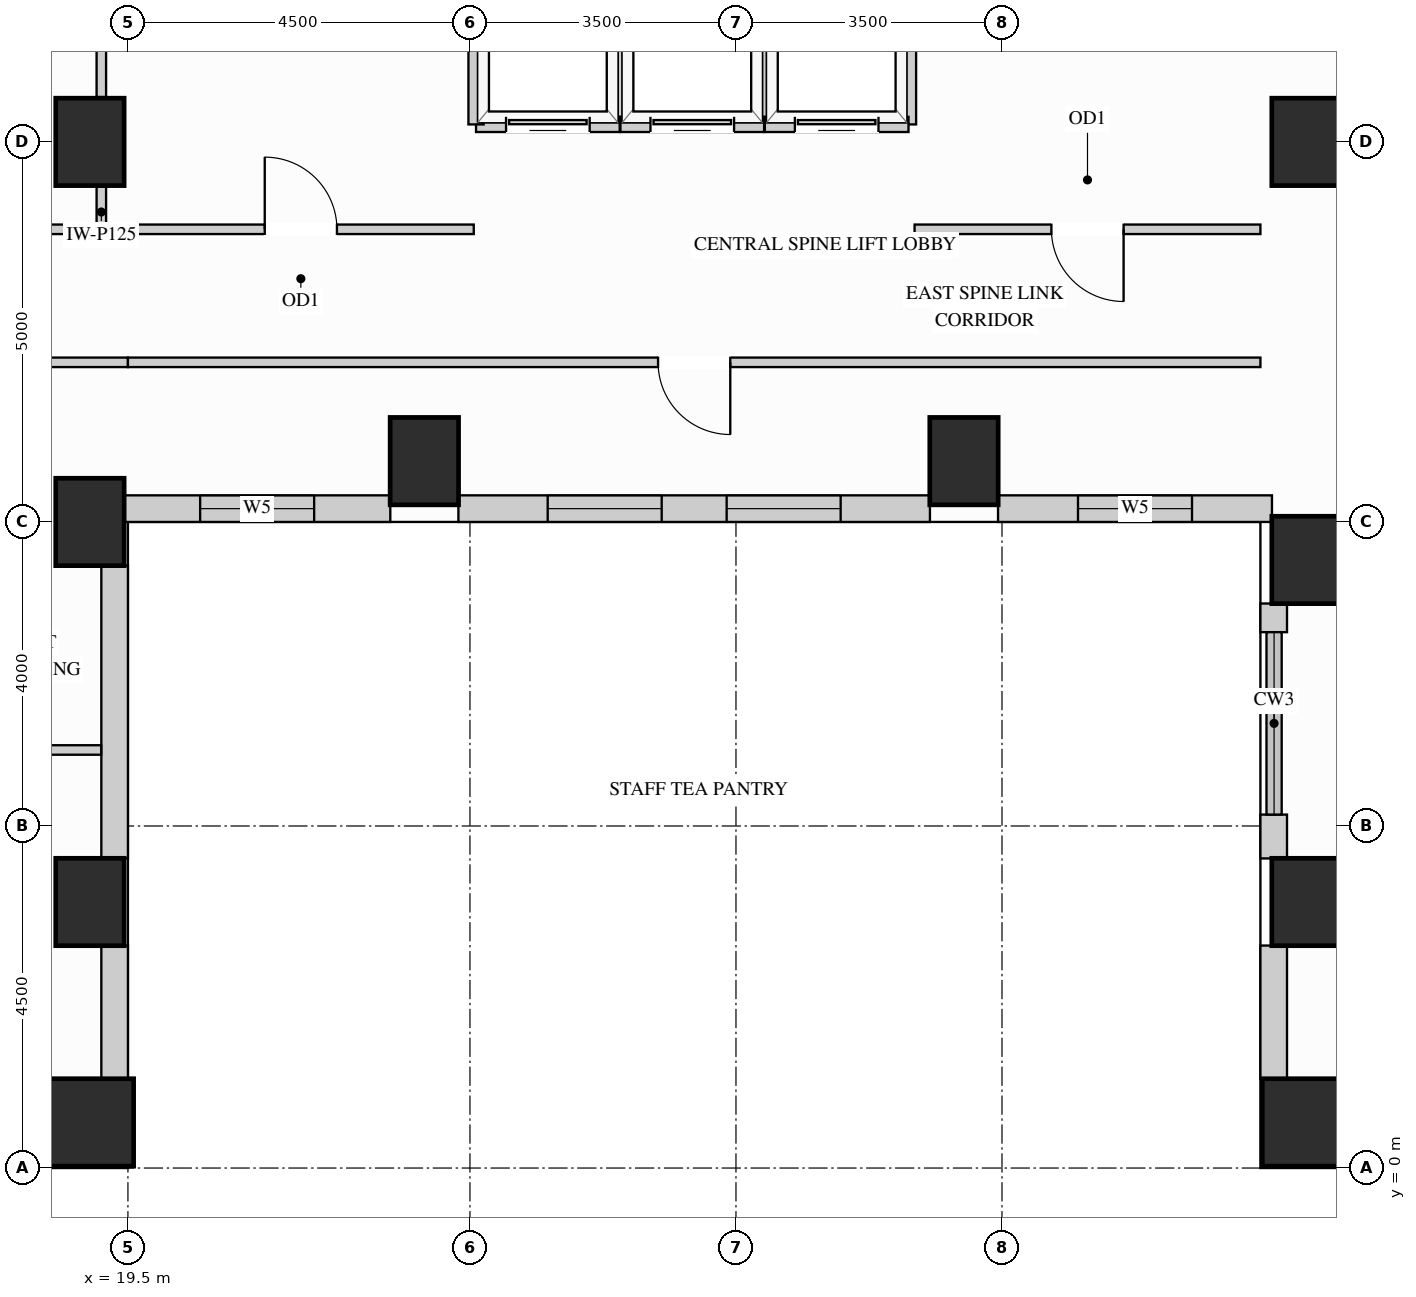
"""IFC4 building model, lengths in metres.
Left out: names, types, materials, properties, quantities, classifications, styles, units other than length and angle.
Written with IfcOpenShell. Run it as: python <this file> out.ifc"""

import sys

from ifc_helpers import new_model, si_unit, direction, frame, frame_2d, origin, origin_2d, place, context, subcontext, project, spatial, rectangle, extrude, source, transform, mapped, element, fill, save


model = new_model("IFC4")
c1 = context("Model", 3, precision=1e-05, world=origin(), true_north=direction((0.0, 1.0)))
c2 = subcontext(c1, "Body", "Model", "MODEL_VIEW")
j1 = project(units=[si_unit("LENGTHUNIT", "METRE"), si_unit("PLANEANGLEUNIT", "RADIAN")], contexts=[c1])
p1 = place(None, origin())
s1 = spatial("IfcSite", under=j1, at=p1, CompositionType="ELEMENT")
p2 = place(p1, origin())
s2 = spatial("IfcBuilding", under=s1, at=p2, CompositionType="ELEMENT")
p3 = place(p2, frame((0.0, 0.0, 131.4)))
s3 = spatial("IfcBuildingStorey", under=s2, at=p3, CompositionType="ELEMENT", Elevation=131.4)
m1 = source(origin(), c2, "Body", "SweptSolid", [
    extrude(rectangle(XDim=0.9, YDim=1.15, at=origin_2d()), origin(), (0.0, 0.0, 1.0), 3.38),
])
for number, where, z_axis, x_axis in (
    (1, (19.0, 13.5, 0.0), (0.0, 0.0, 1.0), (1.0, 0.0, 0.0)),
    (2, (19.0, 3.5, 0.0), (0.0, 0.0, 1.0), (1.0, 0.0, 0.0)),
    (3, (19.0, 8.5, 0.0), (0.0, 0.0, 1.0), (1.0, 0.0, 0.0)),
    (4, (35.0, 13.5, 0.0), (0.0, 0.0, 1.0), (1.0, 0.0, 0.0)),
    (5, (35.0, 3.5, 0.0), (0.0, 0.0, 1.0), (1.0, 0.0, 0.0)),
    (6, (35.0, 8.0, 0.0), (0.0, 0.0, 1.0), (1.0, 0.0, 0.0)),
    (7, (23.4, 9.3, 0.0), (0.0, 0.0, 1.0), (1.0, 0.0, 0.0)),
    (8, (30.5, 9.3, 0.0), (0.0, 0.0, 1.0), (1.0, 0.0, 0.0)),
):
    element("IfcColumn", number, at=place(p3, frame(where, z_axis=z_axis, x_axis=x_axis)), inside=s3, PredefinedType="COLUMN", context=c2, shape_type="MappedRepresentation", body=[
        mapped(m1, transform((0.0, 0.0, 0.0), x_axis=(1.0, 0.0, 0.0), y_axis=(0.0, 1.0, 0.0), z_axis=(0.0, 0.0, 1.0))),
    ])
m2 = source(origin(), c2, "Body", "SweptSolid", [
    extrude(rectangle(XDim=1.15, YDim=1.15, at=origin_2d()), origin(), (0.0, 0.0, 1.0), 3.38),
])
for number, where, z_axis, x_axis in (
    (9, (19.0, 0.6, 0.0), (0.0, 0.0, 1.0), (1.0, 0.0, 0.0)),
    (10, (35.0, 0.6, 0.0), (0.0, 0.0, 1.0), (1.0, 0.0, 0.0)),
):
    element("IfcColumn", number, at=place(p3, frame(where, z_axis=z_axis, x_axis=x_axis)), inside=s3, PredefinedType="COLUMN", context=c2, shape_type="MappedRepresentation", body=[
        mapped(m2, transform((0.0, 0.0, 0.0), x_axis=(1.0, 0.0, 0.0), y_axis=(0.0, 1.0, 0.0), z_axis=(0.0, 0.0, 1.0))),
    ])
m3 = source(origin(), c2, "Body", "SweptSolid", [
    extrude(rectangle(XDim=1.754, YDim=0.35, at=frame_2d((0.877, 0.0))), origin(), (0.0, 0.0, 1.0), 2.519),
])
p4 = place(p3, frame((19.325, 1.173, 0.0), z_axis=(0.0, 0.0, 1.0), x_axis=(0.0, 1.0, 0.0)))
e11 = element("IfcWall", 11, at=p4, inside=s3, PredefinedType="SOLIDWALL", context=c2, shape_type="MappedRepresentation", body=[
    mapped(m3, transform((0.0, 0.0, 0.0), x_axis=(1.0, 0.0, 0.0), y_axis=(0.0, 1.0, 0.0), z_axis=(0.0, 0.0, 1.0))),
])
m4 = source(origin(), c2, "Body", "SweptSolid", [
    extrude(rectangle(XDim=3.854, YDim=0.35, at=frame_2d((1.927, 0.0))), origin(), (0.0, 0.0, 1.0), 2.519),
])
p5 = place(p3, frame((19.325, 4.073, 0.0), z_axis=(0.0, 0.0, 1.0), x_axis=(0.0, 1.0, 0.0)))
e12 = element("IfcWall", 12, at=p5, inside=s3, PredefinedType="SOLIDWALL", context=c2, shape_type="MappedRepresentation", body=[
    mapped(m4, transform((0.0, 0.0, 0.0), x_axis=(1.0, 0.0, 0.0), y_axis=(0.0, 1.0, 0.0), z_axis=(0.0, 0.0, 1.0))),
])
p6 = place(p3, frame((19.448, 8.675, 0.0), z_axis=(0.0, 0.0, 1.0), x_axis=(1.0, 0.0, 0.0)))
e13 = element("IfcWall", 13, at=p6, inside=s3, PredefinedType="SOLIDWALL", context=c2, shape_type="SweptSolid", body=[
    extrude(rectangle(XDim=3.504, YDim=0.35, at=frame_2d((1.752, 0.0))), origin(), (0.0, 0.0, 1.0), 3.365),
])
p7 = place(p6, frame((1.002, 0.0, 0.78)))
e14 = element("IfcOpeningElement", 14, at=p7, cuts=e13, PredefinedType="OPENING", context=c2, shape_type="SweptSolid", body=[
    extrude(rectangle(XDim=1.5, YDim=2.0, at=frame_2d((0.75, 1.0))), frame((0.0, 0.185, 0.0), z_axis=(0.0, -1.0, 0.0), x_axis=(1.0, 0.0, 0.0)), (0.0, 0.0, 1.0), 0.37),
])
p8 = place(p3, frame((23.848, 8.675, 0.0), z_axis=(0.0, 0.0, 1.0), x_axis=(1.0, 0.0, 0.0)))
e15 = element("IfcWall", 15, at=p8, inside=s3, PredefinedType="SOLIDWALL", context=c2, shape_type="SweptSolid", body=[
    extrude(rectangle(XDim=6.204, YDim=0.35, at=frame_2d((3.102, 0.0))), origin(), (0.0, 0.0, 1.0), 3.365),
])
p9 = place(p8, frame((1.175, 0.0, 0.78)))
e16 = element("IfcOpeningElement", 16, at=p9, cuts=e15, PredefinedType="OPENING", context=c2, shape_type="SweptSolid", body=[
    extrude(rectangle(XDim=1.5, YDim=2.0, at=frame_2d((0.75, 1.0))), frame((0.0, 0.185, 0.0), z_axis=(0.0, -1.0, 0.0), x_axis=(1.0, 0.0, 0.0)), (0.0, 0.0, 1.0), 0.37),
])
p10 = place(p8, frame((3.529, 0.0, 0.78)))
e17 = element("IfcOpeningElement", 17, at=p10, cuts=e15, PredefinedType="OPENING", context=c2, shape_type="SweptSolid", body=[
    extrude(rectangle(XDim=1.5, YDim=2.0, at=frame_2d((0.75, 1.0))), frame((0.0, 0.185, 0.0), z_axis=(0.0, -1.0, 0.0), x_axis=(1.0, 0.0, 0.0)), (0.0, 0.0, 1.0), 0.37),
])
p11 = place(p3, frame((30.948, 8.675, 0.0), z_axis=(0.0, 0.0, 1.0), x_axis=(1.0, 0.0, 0.0)))
e18 = element("IfcWall", 18, at=p11, inside=s3, PredefinedType="SOLIDWALL", context=c2, shape_type="SweptSolid", body=[
    extrude(rectangle(XDim=3.604, YDim=0.35, at=frame_2d((1.802, 0.0))), origin(), (0.0, 0.0, 1.0), 3.365),
])
p12 = place(p11, frame((1.052, 0.0, 0.78)))
e19 = element("IfcOpeningElement", 19, at=p12, cuts=e18, PredefinedType="OPENING", context=c2, shape_type="SweptSolid", body=[
    extrude(rectangle(XDim=1.5, YDim=2.0, at=frame_2d((0.75, 1.0))), frame((0.0, 0.185, 0.0), z_axis=(0.0, -1.0, 0.0), x_axis=(1.0, 0.0, 0.0)), (0.0, 0.0, 1.0), 0.37),
])
m5 = source(origin(), c2, "Body", "SweptSolid", [
    extrude(rectangle(XDim=0.377, YDim=0.35, at=frame_2d((0.188, 0.0))), origin(), (0.0, 0.0, 1.0), 3.365),
])
p13 = place(p3, frame((34.575, 7.427, 0.0), z_axis=(0.0, 0.0, 1.0), x_axis=(0.0, -1.0, 0.0)))
e20 = element("IfcWall", 20, at=p13, inside=s3, PredefinedType="SOLIDWALL", context=c2, shape_type="MappedRepresentation", body=[
    mapped(m5, transform((0.0, 0.0, 0.0), x_axis=(1.0, 0.0, 0.0), y_axis=(0.0, 1.0, 0.0), z_axis=(0.0, 0.0, 1.0))),
])
m6 = source(origin(), c2, "Body", "SweptSolid", [
    extrude(rectangle(XDim=0.577, YDim=0.35, at=frame_2d((0.289, 0.0))), origin(), (0.0, 0.0, 1.0), 3.365),
])
p14 = place(p3, frame((34.575, 4.65, 0.0), z_axis=(0.0, 0.0, 1.0), x_axis=(0.0, -1.0, 0.0)))
e21 = element("IfcWall", 21, at=p14, inside=s3, PredefinedType="SOLIDWALL", context=c2, shape_type="MappedRepresentation", body=[
    mapped(m6, transform((0.0, 0.0, 0.0), x_axis=(1.0, 0.0, 0.0), y_axis=(0.0, 1.0, 0.0), z_axis=(0.0, 0.0, 1.0))),
])
m7 = source(origin(), c2, "Body", "SweptSolid", [
    extrude(rectangle(XDim=1.754, YDim=0.35, at=frame_2d((0.877, 0.0))), origin(), (0.0, 0.0, 1.0), 3.365),
])
p15 = place(p3, frame((34.575, 2.927, 0.0), z_axis=(0.0, 0.0, 1.0), x_axis=(0.0, -1.0, 0.0)))
e22 = element("IfcWall", 22, at=p15, inside=s3, PredefinedType="SOLIDWALL", context=c2, shape_type="MappedRepresentation", body=[
    mapped(m7, transform((0.0, 0.0, 0.0), x_axis=(1.0, 0.0, 0.0), y_axis=(0.0, 1.0, 0.0), z_axis=(0.0, 0.0, 1.0))),
])
m8 = source(origin(), c2, "Body", "SweptSolid", [
    extrude(rectangle(XDim=0.56, YDim=0.125, at=frame_2d((0.28, 0.0))), origin(), (0.0, 0.0, 1.0), 2.677),
])
p16 = place(p3, frame((19.15, 12.35, 0.0), z_axis=(0.0, 0.0, 1.0), x_axis=(0.0, 1.0, 0.0)))
e23 = element("IfcWall", 23, at=p16, inside=s3, PredefinedType="PARTITIONING", context=c2, shape_type="MappedRepresentation", body=[
    mapped(m8, transform((0.0, 0.0, 0.0), x_axis=(1.0, 0.0, 0.0), y_axis=(0.0, 1.0, 0.0), z_axis=(0.0, 0.0, 1.0))),
])
m9 = source(origin(), c2, "Body", "SweptSolid", [
    extrude(rectangle(XDim=3.32, YDim=0.125, at=frame_2d((1.66, 0.0))), origin(), (0.0, 0.0, 1.0), 2.677),
])
p17 = place(p3, frame((19.15, 14.09, 0.0), z_axis=(0.0, 0.0, 1.0), x_axis=(0.0, 1.0, 0.0)))
e24 = element("IfcWall", 24, at=p17, inside=s3, PredefinedType="PARTITIONING", context=c2, shape_type="MappedRepresentation", body=[
    mapped(m9, transform((0.0, 0.0, 0.0), x_axis=(1.0, 0.0, 0.0), y_axis=(0.0, 1.0, 0.0), z_axis=(0.0, 0.0, 1.0))),
])
p18 = place(p3, frame((29.85, 12.35, 0.0), z_axis=(0.0, 0.0, 1.0), x_axis=(1.0, 0.0, 0.0)))
e25 = element("IfcWall", 25, at=p18, inside=s3, PredefinedType="PARTITIONING", context=c2, shape_type="SweptSolid", body=[
    extrude(rectangle(XDim=4.55, YDim=0.125, at=frame_2d((2.275, 0.0))), origin(), (0.0, 0.0, 1.0), 3.365),
])
p19 = place(p18, frame((1.8, 0.0, 0.0)))
e26 = element("IfcOpeningElement", 26, at=p19, cuts=e25, PredefinedType="OPENING", context=c2, shape_type="SweptSolid", body=[
    extrude(rectangle(XDim=0.95, YDim=2.15, at=frame_2d((0.475, 1.075))), frame((0.0, 0.073, 0.0), z_axis=(0.0, -1.0, 0.0), x_axis=(1.0, 0.0, 0.0)), (0.0, 0.0, 1.0), 0.145),
])
m10 = source(origin(), c2, "Body", "SweptSolid", [
    extrude(rectangle(XDim=2.45, YDim=0.125, at=frame_2d((1.225, 0.0))), origin(), (0.0, 0.0, 1.0), 3.365),
])
p20 = place(p3, frame((17.05, 12.35, 0.0), z_axis=(0.0, 0.0, 1.0), x_axis=(1.0, 0.0, 0.0)))
e27 = element("IfcWall", 27, at=p20, inside=s3, PredefinedType="PARTITIONING", context=c2, shape_type="MappedRepresentation", body=[
    mapped(m10, transform((0.0, 0.0, 0.0), x_axis=(1.0, 0.0, 0.0), y_axis=(0.0, 1.0, 0.0), z_axis=(0.0, 0.0, 1.0))),
])
p21 = place(p3, frame((19.5, 12.35, 0.0), z_axis=(0.0, 0.0, 1.0), x_axis=(1.0, 0.0, 0.0)))
e28 = element("IfcWall", 28, at=p21, inside=s3, PredefinedType="PARTITIONING", context=c2, shape_type="SweptSolid", body=[
    extrude(rectangle(XDim=4.55, YDim=0.125, at=frame_2d((2.275, 0.0))), origin(), (0.0, 0.0, 1.0), 3.365),
])
p22 = place(p21, frame((1.8, 0.0, 0.0)))
e29 = element("IfcOpeningElement", 29, at=p22, cuts=e28, PredefinedType="OPENING", context=c2, shape_type="SweptSolid", body=[
    extrude(rectangle(XDim=0.95, YDim=2.15, at=frame_2d((0.475, 1.075))), frame((0.0, 0.073, 0.0), z_axis=(0.0, -1.0, 0.0), x_axis=(1.0, 0.0, 0.0)), (0.0, 0.0, 1.0), 0.145),
])
p23 = place(p3, frame((17.05, 10.6, 0.0), z_axis=(0.0, 0.0, 1.0), x_axis=(1.0, 0.0, 0.0)))
e30 = element("IfcWall", 30, at=p23, inside=s3, PredefinedType="PARTITIONING", context=c2, shape_type="MappedRepresentation", body=[
    mapped(m10, transform((0.0, 0.0, 0.0), x_axis=(1.0, 0.0, 0.0), y_axis=(0.0, 1.0, 0.0), z_axis=(0.0, 0.0, 1.0))),
])
p24 = place(p3, frame((19.5, 10.6, 0.0), z_axis=(0.0, 0.0, 1.0), x_axis=(1.0, 0.0, 0.0)))
e31 = element("IfcWall", 31, at=p24, inside=s3, PredefinedType="PARTITIONING", context=c2, shape_type="SweptSolid", body=[
    extrude(rectangle(XDim=14.9, YDim=0.125, at=frame_2d((7.45, 0.0))), origin(), (0.0, 0.0, 1.0), 3.365),
])
p25 = place(p24, frame((6.975, 0.0, 0.0)))
e32 = element("IfcOpeningElement", 32, at=p25, cuts=e31, PredefinedType="OPENING", context=c2, shape_type="SweptSolid", body=[
    extrude(rectangle(XDim=0.95, YDim=2.15, at=frame_2d((0.475, 1.075))), frame((0.0, 0.073, 0.0), z_axis=(0.0, -1.0, 0.0), x_axis=(1.0, 0.0, 0.0)), (0.0, 0.0, 1.0), 0.145),
])
m11 = source(origin(), c2, "Body", "SweptSolid", [
    extrude(rectangle(XDim=2.098, YDim=0.125, at=frame_2d((1.049, 0.0))), origin(), (0.0, 0.0, 1.0), 3.365),
])
p26 = place(p3, frame((17.05, 5.5, 0.0), z_axis=(0.0, 0.0, 1.0), x_axis=(1.0, 0.0, 0.0)))
e33 = element("IfcWall", 33, at=p26, inside=s3, PredefinedType="PARTITIONING", context=c2, shape_type="MappedRepresentation", body=[
    mapped(m11, transform((0.0, 0.0, 0.0), x_axis=(1.0, 0.0, 0.0), y_axis=(0.0, 1.0, 0.0), z_axis=(0.0, 0.0, 1.0))),
])
m12 = source(origin(), c2, "Body", "SweptSolid", [
    extrude(rectangle(XDim=2.29, YDim=0.2, at=frame_2d((1.145, 0.0))), origin(), (0.0, 0.0, 1.0), 3.365),
])
p27 = place(p3, frame((25.97, 13.73, 0.0), z_axis=(0.0, 0.0, 1.0), x_axis=(0.0, 1.0, 0.0)))
e34 = element("IfcWall", 34, at=p27, inside=s3, PredefinedType="PARTITIONING", context=c2, shape_type="MappedRepresentation", body=[
    mapped(m12, transform((0.0, 0.0, 0.0), x_axis=(1.0, 0.0, 0.0), y_axis=(0.0, 1.0, 0.0), z_axis=(0.0, 0.0, 1.0))),
])
p28 = place(p3, frame((24.08, 13.73, 0.0), z_axis=(0.0, 0.0, 1.0), x_axis=(1.0, 0.0, 0.0)))
e35 = element("IfcWall", 35, at=p28, inside=s3, PredefinedType="PARTITIONING", context=c2, shape_type="SweptSolid", body=[
    extrude(rectangle(XDim=1.89, YDim=0.2, at=frame_2d((0.945, 0.0))), origin(), (0.0, 0.0, 1.0), 2.446),
])
p29 = place(p28, frame((0.395, 0.0, 0.0)))
e36 = element("IfcOpeningElement", 36, at=p29, cuts=e35, PredefinedType="OPENING", context=c2, shape_type="SweptSolid", body=[
    extrude(rectangle(XDim=1.1, YDim=2.2, at=frame_2d((0.55, 1.1))), frame((0.0, 0.11, 0.0), z_axis=(0.0, -1.0, 0.0), x_axis=(1.0, 0.0, 0.0)), (0.0, 0.0, 1.0), 0.22),
])
for number, where, z_axis, x_axis in (
    (37, (24.08, 13.73, 0.0), (0.0, 0.0, 1.0), (0.0, 1.0, 0.0)),
    (38, (27.87, 13.73, 0.0), (0.0, 0.0, 1.0), (0.0, 1.0, 0.0)),
):
    element("IfcWall", number, at=place(p3, frame(where, z_axis=z_axis, x_axis=x_axis)), inside=s3, PredefinedType="PARTITIONING", context=c2, shape_type="MappedRepresentation", body=[
        mapped(m12, transform((0.0, 0.0, 0.0), x_axis=(1.0, 0.0, 0.0), y_axis=(0.0, 1.0, 0.0), z_axis=(0.0, 0.0, 1.0))),
    ])
p30 = place(p3, frame((25.98, 13.73, 0.0), z_axis=(0.0, 0.0, 1.0), x_axis=(1.0, 0.0, 0.0)))
e39 = element("IfcWall", 39, at=p30, inside=s3, PredefinedType="PARTITIONING", context=c2, shape_type="SweptSolid", body=[
    extrude(rectangle(XDim=1.89, YDim=0.2, at=frame_2d((0.945, 0.0))), origin(), (0.0, 0.0, 1.0), 2.446),
])
p31 = place(p30, frame((0.395, 0.0, 0.0)))
e40 = element("IfcOpeningElement", 40, at=p31, cuts=e39, PredefinedType="OPENING", context=c2, shape_type="SweptSolid", body=[
    extrude(rectangle(XDim=1.1, YDim=2.2, at=frame_2d((0.55, 1.1))), frame((0.0, 0.11, 0.0), z_axis=(0.0, -1.0, 0.0), x_axis=(1.0, 0.0, 0.0)), (0.0, 0.0, 1.0), 0.22),
])
p32 = place(p3, frame((29.77, 13.73, 0.0), z_axis=(0.0, 0.0, 1.0), x_axis=(0.0, 1.0, 0.0)))
e41 = element("IfcWall", 41, at=p32, inside=s3, PredefinedType="PARTITIONING", context=c2, shape_type="MappedRepresentation", body=[
    mapped(m12, transform((0.0, 0.0, 0.0), x_axis=(1.0, 0.0, 0.0), y_axis=(0.0, 1.0, 0.0), z_axis=(0.0, 0.0, 1.0))),
])
p33 = place(p3, frame((27.88, 13.73, 0.0), z_axis=(0.0, 0.0, 1.0), x_axis=(1.0, 0.0, 0.0)))
e42 = element("IfcWall", 42, at=p33, inside=s3, PredefinedType="PARTITIONING", context=c2, shape_type="SweptSolid", body=[
    extrude(rectangle(XDim=1.89, YDim=0.2, at=frame_2d((0.945, 0.0))), origin(), (0.0, 0.0, 1.0), 2.446),
])
p34 = place(p33, frame((0.395, 0.0, 0.0)))
e43 = element("IfcOpeningElement", 43, at=p34, cuts=e42, PredefinedType="OPENING", context=c2, shape_type="SweptSolid", body=[
    extrude(rectangle(XDim=1.1, YDim=2.2, at=frame_2d((0.55, 1.1))), frame((0.0, 0.11, 0.0), z_axis=(0.0, -1.0, 0.0), x_axis=(1.0, 0.0, 0.0)), (0.0, 0.0, 1.0), 0.22),
])
m13 = source(origin(), c2, "Body", "SweptSolid", [
    extrude(rectangle(XDim=1.1, YDim=2.2, at=frame_2d((0.55, 1.1))), frame((0.0, 0.025, 0.0), z_axis=(0.0, -1.0, 0.0), x_axis=(1.0, 0.0, 0.0)), (0.0, 0.0, 1.0), 0.05),
])
p35 = place(p29, origin())
e44 = element("IfcDoor", 44, at=p35, inside=s3, OperationType="SLIDING_TO_LEFT", PredefinedType="DOOR", context=c2, shape_type="MappedRepresentation", body=[
    mapped(m13, transform((0.0, 0.0, 0.0), x_axis=(1.0, 0.0, 0.0), y_axis=(0.0, 1.0, 0.0), z_axis=(0.0, 0.0, 1.0))),
])
fill(e36, e44)
p36 = place(p31, origin())
e45 = element("IfcDoor", 45, at=p36, inside=s3, OperationType="SLIDING_TO_LEFT", PredefinedType="DOOR", context=c2, shape_type="MappedRepresentation", body=[
    mapped(m13, transform((0.0, 0.0, 0.0), x_axis=(1.0, 0.0, 0.0), y_axis=(0.0, 1.0, 0.0), z_axis=(0.0, 0.0, 1.0))),
])
fill(e40, e45)
p37 = place(p34, origin())
e46 = element("IfcDoor", 46, at=p37, inside=s3, OperationType="SLIDING_TO_LEFT", PredefinedType="DOOR", context=c2, shape_type="MappedRepresentation", body=[
    mapped(m13, transform((0.0, 0.0, 0.0), x_axis=(1.0, 0.0, 0.0), y_axis=(0.0, 1.0, 0.0), z_axis=(0.0, 0.0, 1.0))),
])
fill(e43, e46)
m14 = source(origin(), c2, "Body", "SweptSolid", [
    extrude(rectangle(XDim=0.95, YDim=2.15, at=frame_2d((0.475, 1.075))), frame((0.0, 0.025, 0.0), z_axis=(0.0, -1.0, 0.0), x_axis=(1.0, 0.0, 0.0)), (0.0, 0.0, 1.0), 0.05),
])
p38 = place(p22, origin())
e47 = element("IfcDoor", 47, at=p38, inside=s3, OperationType="SINGLE_SWING_LEFT", PredefinedType="DOOR", context=c2, shape_type="MappedRepresentation", body=[
    mapped(m14, transform((0.0, 0.0, 0.0), x_axis=(1.0, 0.0, 0.0), y_axis=(0.0, 1.0, 0.0), z_axis=(0.0, 0.0, 1.0))),
])
fill(e29, e47)
p39 = place(p19, origin())
e48 = element("IfcDoor", 48, at=p39, inside=s3, OperationType="SINGLE_SWING_RIGHT", PredefinedType="DOOR", context=c2, shape_type="MappedRepresentation", body=[
    mapped(m14, transform((0.0, 0.0, 0.0), x_axis=(1.0, 0.0, 0.0), y_axis=(0.0, 1.0, 0.0), z_axis=(0.0, 0.0, 1.0))),
])
fill(e26, e48)
p40 = place(p25, origin())
e49 = element("IfcDoor", 49, at=p40, inside=s3, OperationType="SINGLE_SWING_RIGHT", PredefinedType="DOOR", context=c2, shape_type="MappedRepresentation", body=[
    mapped(m14, transform((0.0, 0.0, 0.0), x_axis=(1.0, 0.0, 0.0), y_axis=(0.0, 1.0, 0.0), z_axis=(0.0, 0.0, 1.0))),
])
fill(e32, e49)
m15 = source(origin(), c2, "Body", "SweptSolid", [
    extrude(rectangle(XDim=1.5, YDim=2.0, at=frame_2d((0.75, 1.0))), frame((0.0, 0.03, 0.0), z_axis=(0.0, -1.0, 0.0), x_axis=(1.0, 0.0, 0.0)), (0.0, 0.0, 1.0), 0.06),
])
p41 = place(p7, origin())
e50 = element("IfcWindow", 50, at=p41, inside=s3, PartitioningType="SINGLE_PANEL", PredefinedType="WINDOW", context=c2, shape_type="MappedRepresentation", body=[
    mapped(m15, transform((0.0, 0.0, 0.0), x_axis=(1.0, 0.0, 0.0), y_axis=(0.0, 1.0, 0.0), z_axis=(0.0, 0.0, 1.0))),
])
fill(e14, e50)
p42 = place(p9, origin())
e51 = element("IfcWindow", 51, at=p42, inside=s3, PartitioningType="SINGLE_PANEL", PredefinedType="WINDOW", context=c2, shape_type="MappedRepresentation", body=[
    mapped(m15, transform((0.0, 0.0, 0.0), x_axis=(1.0, 0.0, 0.0), y_axis=(0.0, 1.0, 0.0), z_axis=(0.0, 0.0, 1.0))),
])
fill(e16, e51)
p43 = place(p10, origin())
e52 = element("IfcWindow", 52, at=p43, inside=s3, PartitioningType="SINGLE_PANEL", PredefinedType="WINDOW", context=c2, shape_type="MappedRepresentation", body=[
    mapped(m15, transform((0.0, 0.0, 0.0), x_axis=(1.0, 0.0, 0.0), y_axis=(0.0, 1.0, 0.0), z_axis=(0.0, 0.0, 1.0))),
])
fill(e17, e52)
p44 = place(p12, origin())
e53 = element("IfcWindow", 53, at=p44, inside=s3, PartitioningType="SINGLE_PANEL", PredefinedType="WINDOW", context=c2, shape_type="MappedRepresentation", body=[
    mapped(m15, transform((0.0, 0.0, 0.0), x_axis=(1.0, 0.0, 0.0), y_axis=(0.0, 1.0, 0.0), z_axis=(0.0, 0.0, 1.0))),
])
fill(e19, e53)
save(model, sys.argv[1])
